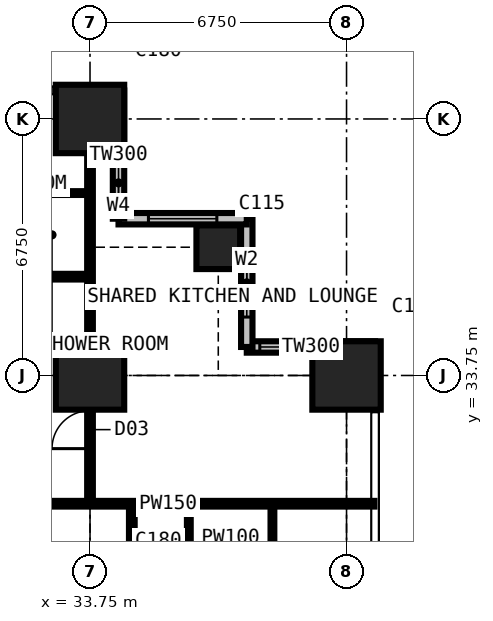
"""IFC4 building model, lengths in metres.
Left out: names, types, materials, properties, quantities, classifications, styles, units other than length and angle.
Written with IfcOpenShell. Run it as: python <this file> out.ifc"""

import sys

from ifc_helpers import new_model, si_unit, direction, frame, frame_2d, origin, origin_2d, place, context, subcontext, project, spatial, rectangle, extrude, element, fill, save


model = new_model("IFC4")
c1 = context("Model", 3, precision=1e-05, world=origin(), true_north=direction((0.0, 1.0)))
c2 = subcontext(c1, "Body", "Model", "MODEL_VIEW")
j1 = project(units=[si_unit("LENGTHUNIT", "METRE"), si_unit("PLANEANGLEUNIT", "RADIAN")], contexts=[c1])
p1 = place(None, origin())
s1 = spatial("IfcSite", under=j1, at=p1, CompositionType="ELEMENT")
p2 = place(p1, origin())
s2 = spatial("IfcBuilding", under=s1, at=p2, CompositionType="ELEMENT")
p3 = place(p2, frame((0.0, 0.0, 61.2)))
s3 = spatial("IfcBuildingStorey", under=s2, at=p3, CompositionType="ELEMENT", Elevation=61.2)
for number, where, z_axis, x_axis in (
    (1, (33.75, 33.75, 0.0), (0.0, 0.0, 1.0), (1.0, 0.0, 0.0)),
    (2, (33.75, 40.5, 0.0), (0.0, 0.0, 1.0), (1.0, 0.0, 0.0)),
):
    element("IfcColumn", number, at=place(p3, frame(where, z_axis=z_axis, x_axis=x_axis)), inside=s3, PredefinedType="COLUMN", context=c2, shape_type="SweptSolid", body=[
        extrude(rectangle(XDim=1.8, YDim=1.8, at=origin_2d()), origin(), (0.0, 0.0, 1.0), 3.6),
    ])
p4 = place(p3, frame((37.125, 37.125, 0.0), z_axis=(0.0, 0.0, 1.0), x_axis=(1.0, 0.0, 0.0)))
e3 = element("IfcColumn", 3, at=p4, inside=s3, PredefinedType="COLUMN", context=c2, shape_type="SweptSolid", body=[
    extrude(rectangle(XDim=1.15, YDim=1.15, at=origin_2d()), origin(), (0.0, 0.0, 1.0), 3.6),
])
p5 = place(p3, frame((40.5, 33.75, 0.0), z_axis=(0.0, 0.0, 1.0), x_axis=(1.0, 0.0, 0.0)))
e4 = element("IfcColumn", 4, at=p5, inside=s3, PredefinedType="COLUMN", context=c2, shape_type="SweptSolid", body=[
    extrude(rectangle(XDim=1.8, YDim=1.8, at=origin_2d()), origin(), (0.0, 0.0, 1.0), 3.6),
])
p6 = place(p3, frame((41.25, 34.5, 0.0), z_axis=(0.0, 0.0, 1.0), x_axis=(-1.0, 0.0, 0.0)))
e5 = element("IfcWall", 5, at=p6, inside=s3, PredefinedType="SOLIDWALL", context=c2, shape_type="SweptSolid", body=[
    extrude(rectangle(XDim=3.375, YDim=0.3, at=frame_2d((1.688, 0.0))), origin(), (0.0, 0.0, 1.0), 3.375),
])
p7 = place(p6, frame((1.833, 0.0, 0.9)))
e6 = element("IfcOpeningElement", 6, at=p7, cuts=e5, PredefinedType="OPENING", context=c2, shape_type="SweptSolid", body=[
    extrude(rectangle(XDim=1.2, YDim=1.8, at=frame_2d((0.6, 0.9))), frame((0.0, 0.16, 0.0), z_axis=(0.0, -1.0, 0.0), x_axis=(1.0, 0.0, 0.0)), (0.0, 0.0, 1.0), 0.32),
])
p8 = place(p3, frame((37.875, 34.5, 0.0), z_axis=(0.0, 0.0, 1.0), x_axis=(0.0, 1.0, 0.0)))
e7 = element("IfcWall", 7, at=p8, inside=s3, PredefinedType="SOLIDWALL", context=c2, shape_type="SweptSolid", body=[
    extrude(rectangle(XDim=3.375, YDim=0.3, at=frame_2d((1.688, 0.0))), origin(), (0.0, 0.0, 1.0), 3.375),
])
p9 = place(p8, frame((0.788, 0.0, 0.6)))
e8 = element("IfcOpeningElement", 8, at=p9, cuts=e7, PredefinedType="OPENING", context=c2, shape_type="SweptSolid", body=[
    extrude(rectangle(XDim=1.8, YDim=2.1, at=frame_2d((0.9, 1.05))), frame((0.0, 0.16, 0.0), z_axis=(0.0, -1.0, 0.0), x_axis=(1.0, 0.0, 0.0)), (0.0, 0.0, 1.0), 0.32),
])
p10 = place(p3, frame((37.875, 37.875, 0.0), z_axis=(0.0, 0.0, 1.0), x_axis=(-1.0, 0.0, 0.0)))
e9 = element("IfcWall", 9, at=p10, inside=s3, PredefinedType="SOLIDWALL", context=c2, shape_type="SweptSolid", body=[
    extrude(rectangle(XDim=3.375, YDim=0.3, at=frame_2d((1.688, 0.0))), origin(), (0.0, 0.0, 1.0), 3.375),
])
p11 = place(p10, frame((0.788, 0.0, 0.6)))
e10 = element("IfcOpeningElement", 10, at=p11, cuts=e9, PredefinedType="OPENING", context=c2, shape_type="SweptSolid", body=[
    extrude(rectangle(XDim=1.8, YDim=2.1, at=frame_2d((0.9, 1.05))), frame((0.0, 0.16, 0.0), z_axis=(0.0, -1.0, 0.0), x_axis=(1.0, 0.0, 0.0)), (0.0, 0.0, 1.0), 0.32),
])
p12 = place(p3, frame((34.5, 37.875, 0.0), z_axis=(0.0, 0.0, 1.0), x_axis=(0.0, 1.0, 0.0)))
e11 = element("IfcWall", 11, at=p12, inside=s3, PredefinedType="SOLIDWALL", context=c2, shape_type="SweptSolid", body=[
    extrude(rectangle(XDim=3.375, YDim=0.3, at=frame_2d((1.688, 0.0))), origin(), (0.0, 0.0, 1.0), 3.375),
])
p13 = place(p12, frame((0.343, 0.0, 0.9)))
e12 = element("IfcOpeningElement", 12, at=p13, cuts=e11, PredefinedType="OPENING", context=c2, shape_type="SweptSolid", body=[
    extrude(rectangle(XDim=1.2, YDim=1.8, at=frame_2d((0.6, 0.9))), frame((0.0, 0.16, 0.0), z_axis=(0.0, -1.0, 0.0), x_axis=(1.0, 0.0, 0.0)), (0.0, 0.0, 1.0), 0.32),
])
p14 = place(p3, frame((10.125, 36.35, 0.0), z_axis=(0.0, 0.0, 1.0), x_axis=(1.0, 0.0, 0.0)))
e13 = element("IfcWall", 13, at=p14, inside=s3, PredefinedType="PARTITIONING", context=c2, shape_type="SweptSolid", body=[
    extrude(rectangle(XDim=23.625, YDim=0.15, at=frame_2d((11.812, 0.0))), origin(), (0.0, 0.0, 1.0), 3.375),
])
p15 = place(p14, frame((20.5, 0.0, 0.0)))
e14 = element("IfcOpeningElement", 14, at=p15, cuts=e13, PredefinedType="OPENING", context=c2, shape_type="SweptSolid", body=[
    extrude(rectangle(XDim=0.95, YDim=2.2, at=frame_2d((0.475, 1.1))), frame((0.0, 0.085, 0.0), z_axis=(0.0, -1.0, 0.0), x_axis=(1.0, 0.0, 0.0)), (0.0, 0.0, 1.0), 0.17),
])
p16 = place(p14, frame((17.125, 0.0, 0.0)))
e15 = element("IfcOpeningElement", 15, at=p16, cuts=e13, PredefinedType="OPENING", context=c2, shape_type="SweptSolid", body=[
    extrude(rectangle(XDim=0.95, YDim=2.2, at=frame_2d((0.475, 1.1))), frame((0.0, 0.085, 0.0), z_axis=(0.0, -1.0, 0.0), x_axis=(1.0, 0.0, 0.0)), (0.0, 0.0, 1.0), 0.17),
])
p17 = place(p14, frame((13.7, 0.0, 0.0)))
e16 = element("IfcOpeningElement", 16, at=p17, cuts=e13, PredefinedType="OPENING", context=c2, shape_type="SweptSolid", body=[
    extrude(rectangle(XDim=0.95, YDim=2.2, at=frame_2d((0.475, 1.1))), frame((0.0, 0.085, 0.0), z_axis=(0.0, -1.0, 0.0), x_axis=(1.0, 0.0, 0.0)), (0.0, 0.0, 1.0), 0.17),
])
p18 = place(p14, frame((4.2, 0.0, 0.0)))
e17 = element("IfcOpeningElement", 17, at=p18, cuts=e13, PredefinedType="OPENING", context=c2, shape_type="SweptSolid", body=[
    extrude(rectangle(XDim=0.95, YDim=2.2, at=frame_2d((0.475, 1.1))), frame((0.0, 0.085, 0.0), z_axis=(0.0, -1.0, 0.0), x_axis=(1.0, 0.0, 0.0)), (0.0, 0.0, 1.0), 0.17),
])
p19 = place(p14, frame((10.95, 0.0, 0.0)))
e18 = element("IfcOpeningElement", 18, at=p19, cuts=e13, PredefinedType="OPENING", context=c2, shape_type="SweptSolid", body=[
    extrude(rectangle(XDim=0.95, YDim=2.2, at=frame_2d((0.475, 1.1))), frame((0.0, 0.085, 0.0), z_axis=(0.0, -1.0, 0.0), x_axis=(1.0, 0.0, 0.0)), (0.0, 0.0, 1.0), 0.17),
])
p20 = place(p3, frame((30.375, 30.375, 0.0), z_axis=(0.0, 0.0, 1.0), x_axis=(1.0, 0.0, 0.0)))
e19 = element("IfcWall", 19, at=p20, inside=s3, PredefinedType="PARTITIONING", context=c2, shape_type="SweptSolid", body=[
    extrude(rectangle(XDim=10.859, YDim=0.15, at=frame_2d((5.429, 0.0))), origin(), (0.0, 0.0, 1.0), 3.375),
])
p21 = place(p3, frame((31.75, 38.55, 0.0), z_axis=(0.0, 0.0, 1.0), x_axis=(1.0, 0.0, 0.0)))
e20 = element("IfcWall", 20, at=p21, inside=s3, PredefinedType="PARTITIONING", context=c2, shape_type="SweptSolid", body=[
    extrude(rectangle(XDim=2.0, YDim=0.1, at=frame_2d((1.0, 0.0))), origin(), (0.0, 0.0, 1.0), 3.375),
])
p22 = place(p3, frame((33.75, 30.375, 0.0), z_axis=(0.0, 0.0, 1.0), x_axis=(0.0, 1.0, 0.0)))
e21 = element("IfcWall", 21, at=p22, inside=s3, PredefinedType="PARTITIONING", context=c2, shape_type="SweptSolid", body=[
    extrude(rectangle(XDim=10.859, YDim=0.15, at=frame_2d((5.429, 0.0))), origin(), (0.0, 0.0, 1.0), 2.877),
])
p23 = place(p22, frame((1.45, 0.0, 0.0)))
e22 = element("IfcOpeningElement", 22, at=p23, cuts=e21, PredefinedType="OPENING", context=c2, shape_type="SweptSolid", body=[
    extrude(rectangle(XDim=1.0, YDim=2.2, at=frame_2d((0.5, 1.1))), frame((0.0, 0.085, 0.0), z_axis=(0.0, -1.0, 0.0), x_axis=(1.0, 0.0, 0.0)), (0.0, 0.0, 1.0), 0.17),
])
p24 = place(p3, frame((34.85, 12.55, 0.0), z_axis=(0.0, 0.0, 1.0), x_axis=(0.0, 1.0, 0.0)))
e23 = element("IfcWall", 23, at=p24, inside=s3, PredefinedType="PARTITIONING", context=c2, shape_type="SweptSolid", body=[
    extrude(rectangle(XDim=17.825, YDim=0.15, at=frame_2d((8.913, 0.0))), origin(), (0.0, 0.0, 1.0), 3.375),
])
p25 = place(p24, frame((8.6, 0.0, 0.0)))
e24 = element("IfcOpeningElement", 24, at=p25, cuts=e23, PredefinedType="OPENING", context=c2, shape_type="SweptSolid", body=[
    extrude(rectangle(XDim=0.95, YDim=2.2, at=frame_2d((0.475, 1.1))), frame((0.0, 0.085, 0.0), z_axis=(0.0, -1.0, 0.0), x_axis=(1.0, 0.0, 0.0)), (0.0, 0.0, 1.0), 0.17),
])
p26 = place(p3, frame((36.35, 6.75, 0.0), z_axis=(0.0, 0.0, 1.0), x_axis=(0.0, 1.0, 0.0)))
e25 = element("IfcWall", 25, at=p26, inside=s3, PredefinedType="PARTITIONING", context=c2, shape_type="SweptSolid", body=[
    extrude(rectangle(XDim=23.625, YDim=0.1, at=frame_2d((11.812, 0.0))), origin(), (0.0, 0.0, 1.0), 3.375),
])
p27 = place(p26, frame((3.575, 0.0, 0.0)))
e26 = element("IfcOpeningElement", 26, at=p27, cuts=e25, PredefinedType="OPENING", context=c2, shape_type="SweptSolid", body=[
    extrude(rectangle(XDim=0.95, YDim=2.2, at=frame_2d((0.475, 1.1))), frame((0.0, 0.06, 0.0), z_axis=(0.0, -1.0, 0.0), x_axis=(1.0, 0.0, 0.0)), (0.0, 0.0, 1.0), 0.12),
])
p28 = place(p26, frame((7.0, 0.0, 0.0)))
e27 = element("IfcOpeningElement", 27, at=p28, cuts=e25, PredefinedType="OPENING", context=c2, shape_type="SweptSolid", body=[
    extrude(rectangle(XDim=0.95, YDim=2.2, at=frame_2d((0.475, 1.1))), frame((0.0, 0.06, 0.0), z_axis=(0.0, -1.0, 0.0), x_axis=(1.0, 0.0, 0.0)), (0.0, 0.0, 1.0), 0.12),
])
p29 = place(p26, frame((10.375, 0.0, 0.0)))
e28 = element("IfcOpeningElement", 28, at=p29, cuts=e25, PredefinedType="OPENING", context=c2, shape_type="SweptSolid", body=[
    extrude(rectangle(XDim=0.95, YDim=2.2, at=frame_2d((0.475, 1.1))), frame((0.0, 0.06, 0.0), z_axis=(0.0, -1.0, 0.0), x_axis=(1.0, 0.0, 0.0)), (0.0, 0.0, 1.0), 0.12),
])
p30 = place(p26, frame((13.75, 0.0, 0.0)))
e29 = element("IfcOpeningElement", 29, at=p30, cuts=e25, PredefinedType="OPENING", context=c2, shape_type="SweptSolid", body=[
    extrude(rectangle(XDim=0.95, YDim=2.2, at=frame_2d((0.475, 1.1))), frame((0.0, 0.06, 0.0), z_axis=(0.0, -1.0, 0.0), x_axis=(1.0, 0.0, 0.0)), (0.0, 0.0, 1.0), 0.12),
])
p31 = place(p26, frame((17.125, 0.0, 0.0)))
e30 = element("IfcOpeningElement", 30, at=p31, cuts=e25, PredefinedType="OPENING", context=c2, shape_type="SweptSolid", body=[
    extrude(rectangle(XDim=0.95, YDim=2.2, at=frame_2d((0.475, 1.1))), frame((0.0, 0.06, 0.0), z_axis=(0.0, -1.0, 0.0), x_axis=(1.0, 0.0, 0.0)), (0.0, 0.0, 1.0), 0.12),
])
p32 = place(p26, frame((20.5, 0.0, 0.0)))
e31 = element("IfcOpeningElement", 31, at=p32, cuts=e25, PredefinedType="OPENING", context=c2, shape_type="SweptSolid", body=[
    extrude(rectangle(XDim=0.95, YDim=2.2, at=frame_2d((0.475, 1.1))), frame((0.0, 0.06, 0.0), z_axis=(0.0, -1.0, 0.0), x_axis=(1.0, 0.0, 0.0)), (0.0, 0.0, 1.0), 0.12),
])
p33 = place(p3, frame((38.55, 28.375, 0.0), z_axis=(0.0, 0.0, 1.0), x_axis=(0.0, 1.0, 0.0)))
e32 = element("IfcWall", 32, at=p33, inside=s3, PredefinedType="PARTITIONING", context=c2, shape_type="SweptSolid", body=[
    extrude(rectangle(XDim=2.0, YDim=0.1, at=frame_2d((1.0, 0.0))), origin(), (0.0, 0.0, 1.0), 3.375),
])
p34 = place(p7, origin())
e33 = element("IfcWindow", 33, at=p34, inside=s3, PartitioningType="SINGLE_PANEL", PredefinedType="WINDOW", context=c2, shape_type="SweptSolid", body=[
    extrude(rectangle(XDim=1.2, YDim=1.8, at=frame_2d((0.6, 0.9))), frame((0.0, 0.03, 0.0), z_axis=(0.0, -1.0, 0.0), x_axis=(1.0, 0.0, 0.0)), (0.0, 0.0, 1.0), 0.06),
])
fill(e6, e33)
p35 = place(p9, origin())
e34 = element("IfcWindow", 34, at=p35, inside=s3, PartitioningType="SINGLE_PANEL", PredefinedType="WINDOW", context=c2, shape_type="SweptSolid", body=[
    extrude(rectangle(XDim=1.8, YDim=2.1, at=frame_2d((0.9, 1.05))), frame((0.0, 0.03, 0.0), z_axis=(0.0, -1.0, 0.0), x_axis=(1.0, 0.0, 0.0)), (0.0, 0.0, 1.0), 0.06),
])
fill(e8, e34)
p36 = place(p11, origin())
e35 = element("IfcWindow", 35, at=p36, inside=s3, PartitioningType="SINGLE_PANEL", PredefinedType="WINDOW", context=c2, shape_type="SweptSolid", body=[
    extrude(rectangle(XDim=1.8, YDim=2.1, at=frame_2d((0.9, 1.05))), frame((0.0, 0.03, 0.0), z_axis=(0.0, -1.0, 0.0), x_axis=(1.0, 0.0, 0.0)), (0.0, 0.0, 1.0), 0.06),
])
fill(e10, e35)
p37 = place(p13, origin())
e36 = element("IfcWindow", 36, at=p37, inside=s3, PartitioningType="SINGLE_PANEL", PredefinedType="WINDOW", context=c2, shape_type="SweptSolid", body=[
    extrude(rectangle(XDim=1.2, YDim=1.8, at=frame_2d((0.6, 0.9))), frame((0.0, 0.03, 0.0), z_axis=(0.0, -1.0, 0.0), x_axis=(1.0, 0.0, 0.0)), (0.0, 0.0, 1.0), 0.06),
])
fill(e12, e36)
p38 = place(p23, origin())
e37 = element("IfcDoor", 37, at=p38, inside=s3, OperationType="SINGLE_SWING_LEFT", PredefinedType="DOOR", context=c2, shape_type="SweptSolid", body=[
    extrude(rectangle(XDim=1.0, YDim=2.2, at=frame_2d((0.5, 1.1))), frame((0.0, 0.025, 0.0), z_axis=(0.0, -1.0, 0.0), x_axis=(1.0, 0.0, 0.0)), (0.0, 0.0, 1.0), 0.05),
])
fill(e22, e37)
save(model, sys.argv[1])
